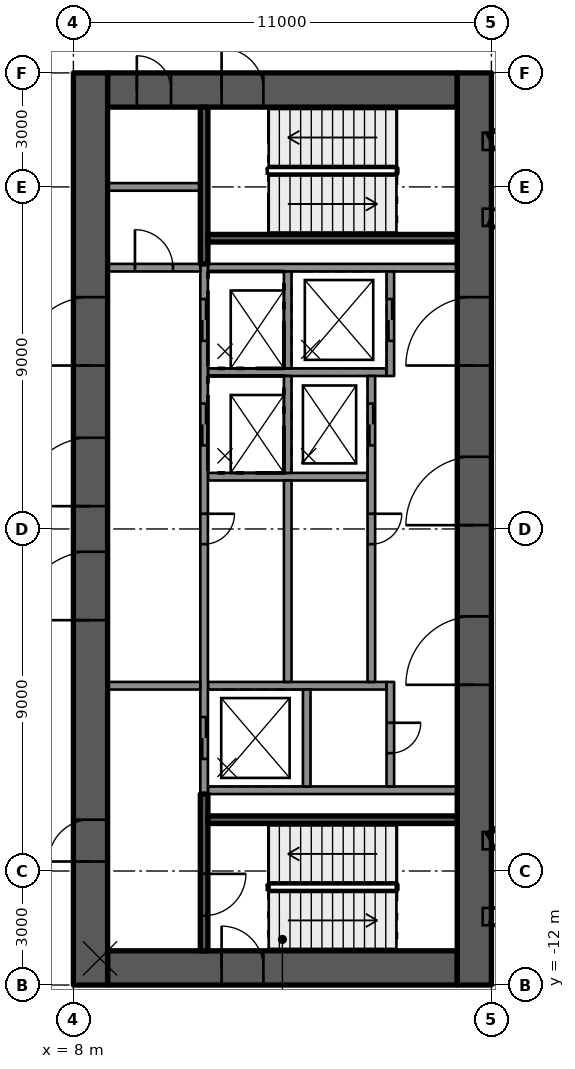
"""IFC4 building model, lengths in metres.
Left out: names, types, materials, properties, quantities, classifications, styles, units other than length and angle.
Written with IfcOpenShell. Run it as: python <this file> out.ifc"""

import sys

from ifc_helpers import new_model, si_unit, direction, frame, frame_2d, origin, place, context, subcontext, project, spatial, rectangle, extrude, element, fill, save


model = new_model("IFC4")
c1 = context("Model", 3, precision=1e-05, world=origin(), true_north=direction((0.0, 1.0)))
c2 = subcontext(c1, "Body", "Model", "MODEL_VIEW")
j1 = project(units=[si_unit("LENGTHUNIT", "METRE"), si_unit("PLANEANGLEUNIT", "RADIAN")], contexts=[c1])
p1 = place(None, origin())
s1 = spatial("IfcSite", under=j1, at=p1, CompositionType="ELEMENT")
p2 = place(p1, origin())
s2 = spatial("IfcBuilding", under=s1, at=p2, CompositionType="ELEMENT")
p3 = place(p2, frame((0.0, 0.0, 206.1)))
s3 = spatial("IfcBuildingStorey", under=s2, at=p3, CompositionType="ELEMENT", Elevation=206.1)
p4 = place(p3, frame((8.9, 11.55, 0.0), z_axis=(0.0, 0.0, 1.0), x_axis=(1.0, 0.0, 0.0)))
e1 = element("IfcWall", 1, at=p4, inside=s3, PredefinedType="SHEAR", context=c2, shape_type="SweptSolid", body=[
    extrude(rectangle(XDim=9.2, YDim=0.9, at=frame_2d((4.6, 0.0))), origin(), (0.0, 0.0, 1.0), 4.4),
])
p5 = place(p4, frame((3.0, 0.0, 0.0)))
e2 = element("IfcOpeningElement", 2, at=p5, cuts=e1, PredefinedType="OPENING", context=c2, shape_type="SweptSolid", body=[
    extrude(rectangle(XDim=1.1, YDim=2.1, at=frame_2d((0.55, 1.05))), frame((0.0, 0.46, 0.0), z_axis=(0.0, -1.0, 0.0), x_axis=(1.0, 0.0, 0.0)), (0.0, 0.0, 1.0), 0.92),
])
p6 = place(p4, frame((0.77, 0.0, 0.0)))
e3 = element("IfcOpeningElement", 3, at=p6, cuts=e1, PredefinedType="OPENING", context=c2, shape_type="SweptSolid", body=[
    extrude(rectangle(XDim=0.9, YDim=2.1, at=frame_2d((0.45, 1.05))), frame((0.0, 0.46, 0.0), z_axis=(0.0, -1.0, 0.0), x_axis=(1.0, 0.0, 0.0)), (0.0, 0.0, 1.0), 0.92),
])
p7 = place(p3, frame((8.9, -11.55, 0.0), z_axis=(0.0, 0.0, 1.0), x_axis=(1.0, 0.0, 0.0)))
e4 = element("IfcWall", 4, at=p7, inside=s3, PredefinedType="SHEAR", context=c2, shape_type="SweptSolid", body=[
    extrude(rectangle(XDim=9.2, YDim=0.9, at=frame_2d((4.6, 0.0))), origin(), (0.0, 0.0, 1.0), 4.4),
])
p8 = place(p7, frame((3.0, 0.0, 0.0)))
e5 = element("IfcOpeningElement", 5, at=p8, cuts=e4, PredefinedType="OPENING", context=c2, shape_type="SweptSolid", body=[
    extrude(rectangle(XDim=1.1, YDim=2.1, at=frame_2d((0.55, 1.05))), frame((0.0, 0.46, 0.0), z_axis=(0.0, -1.0, 0.0), x_axis=(1.0, 0.0, 0.0)), (0.0, 0.0, 1.0), 0.92),
])
p9 = place(p3, frame((8.45, -12.0, 0.0), z_axis=(0.0, 0.0, 1.0), x_axis=(0.0, 1.0, 0.0)))
e6 = element("IfcWall", 6, at=p9, inside=s3, PredefinedType="SHEAR", context=c2, shape_type="SweptSolid", body=[
    extrude(rectangle(XDim=24.0, YDim=0.9, at=frame_2d((12.0, 0.0))), origin(), (0.0, 0.0, 1.0), 4.4),
])
p10 = place(p9, frame((12.6, 0.0, 0.0)))
e7 = element("IfcOpeningElement", 7, at=p10, cuts=e6, PredefinedType="OPENING", context=c2, shape_type="SweptSolid", body=[
    extrude(rectangle(XDim=1.8, YDim=2.1, at=frame_2d((0.9, 1.05))), frame((0.0, 0.46, 0.0), z_axis=(0.0, -1.0, 0.0), x_axis=(1.0, 0.0, 0.0)), (0.0, 0.0, 1.0), 0.92),
])
p11 = place(p9, frame((16.3, 0.0, 0.0)))
e8 = element("IfcOpeningElement", 8, at=p11, cuts=e6, PredefinedType="OPENING", context=c2, shape_type="SweptSolid", body=[
    extrude(rectangle(XDim=1.8, YDim=2.1, at=frame_2d((0.9, 1.05))), frame((0.0, 0.46, 0.0), z_axis=(0.0, -1.0, 0.0), x_axis=(1.0, 0.0, 0.0)), (0.0, 0.0, 1.0), 0.92),
])
p12 = place(p9, frame((9.6, 0.0, 0.0)))
e9 = element("IfcOpeningElement", 9, at=p12, cuts=e6, PredefinedType="OPENING", context=c2, shape_type="SweptSolid", body=[
    extrude(rectangle(XDim=1.8, YDim=2.1, at=frame_2d((0.9, 1.05))), frame((0.0, 0.46, 0.0), z_axis=(0.0, -1.0, 0.0), x_axis=(1.0, 0.0, 0.0)), (0.0, 0.0, 1.0), 0.92),
])
p13 = place(p9, frame((3.25, 0.0, 0.0)))
e10 = element("IfcOpeningElement", 10, at=p13, cuts=e6, PredefinedType="OPENING", context=c2, shape_type="SweptSolid", body=[
    extrude(rectangle(XDim=1.1, YDim=2.1, at=frame_2d((0.55, 1.05))), frame((0.0, 0.46, 0.0), z_axis=(0.0, -1.0, 0.0), x_axis=(1.0, 0.0, 0.0)), (0.0, 0.0, 1.0), 0.92),
])
p14 = place(p3, frame((18.55, -12.0, 0.0), z_axis=(0.0, 0.0, 1.0), x_axis=(0.0, 1.0, 0.0)))
e11 = element("IfcWall", 11, at=p14, inside=s3, PredefinedType="SHEAR", context=c2, shape_type="SweptSolid", body=[
    extrude(rectangle(XDim=24.0, YDim=0.9, at=frame_2d((12.0, 0.0))), origin(), (0.0, 0.0, 1.0), 4.4),
])
p15 = place(p14, frame((16.3, 0.0, 0.0)))
e12 = element("IfcOpeningElement", 12, at=p15, cuts=e11, PredefinedType="OPENING", context=c2, shape_type="SweptSolid", body=[
    extrude(rectangle(XDim=1.8, YDim=2.1, at=frame_2d((0.9, 1.05))), frame((0.0, 0.46, 0.0), z_axis=(0.0, -1.0, 0.0), x_axis=(1.0, 0.0, 0.0)), (0.0, 0.0, 1.0), 0.92),
])
p16 = place(p14, frame((12.1, 0.0, 0.0)))
e13 = element("IfcOpeningElement", 13, at=p16, cuts=e11, PredefinedType="OPENING", context=c2, shape_type="SweptSolid", body=[
    extrude(rectangle(XDim=1.8, YDim=2.1, at=frame_2d((0.9, 1.05))), frame((0.0, 0.46, 0.0), z_axis=(0.0, -1.0, 0.0), x_axis=(1.0, 0.0, 0.0)), (0.0, 0.0, 1.0), 0.92),
])
p17 = place(p14, frame((7.9, 0.0, 0.0)))
e14 = element("IfcOpeningElement", 14, at=p17, cuts=e11, PredefinedType="OPENING", context=c2, shape_type="SweptSolid", body=[
    extrude(rectangle(XDim=1.8, YDim=2.1, at=frame_2d((0.9, 1.05))), frame((0.0, 0.46, 0.0), z_axis=(0.0, -1.0, 0.0), x_axis=(1.0, 0.0, 0.0)), (0.0, 0.0, 1.0), 0.92),
])
for number, where, z_axis, x_axis in (
    (15, (11.54, -6.875, 0.0), (0.0, 0.0, 1.0), (1.0, 0.0, 0.0)),
    (16, (11.54, 6.875, 0.0), (0.0, 0.0, 1.0), (1.0, 0.0, 0.0)),
):
    element("IfcWall", number, at=place(p3, frame(where, z_axis=z_axis, x_axis=x_axis)), inside=s3, PredefinedType="SOLIDWALL", context=c2, shape_type="SweptSolid", body=[
        extrude(rectangle(XDim=6.56, YDim=0.2, at=frame_2d((3.28, 0.0))), origin(), (0.0, 0.0, 1.0), 3.99),
    ])
p18 = place(p3, frame((11.54, 4.125, 0.0), z_axis=(0.0, 0.0, 1.0), x_axis=(1.0, 0.0, 0.0)))
e17 = element("IfcWall", 17, at=p18, inside=s3, PredefinedType="SOLIDWALL", context=c2, shape_type="SweptSolid", body=[
    extrude(rectangle(XDim=4.7, YDim=0.2, at=frame_2d((2.35, 0.0))), origin(), (0.0, 0.0, 1.0), 3.99),
])
p19 = place(p3, frame((11.54, 1.375, 0.0), z_axis=(0.0, 0.0, 1.0), x_axis=(1.0, 0.0, 0.0)))
e18 = element("IfcWall", 18, at=p19, inside=s3, PredefinedType="SOLIDWALL", context=c2, shape_type="SweptSolid", body=[
    extrude(rectangle(XDim=4.2, YDim=0.2, at=frame_2d((2.1, 0.0))), origin(), (0.0, 0.0, 1.0), 3.99),
])
p20 = place(p3, frame((11.54, -4.125, 0.0), z_axis=(0.0, 0.0, 1.0), x_axis=(1.0, 0.0, 0.0)))
e19 = element("IfcWall", 19, at=p20, inside=s3, PredefinedType="SOLIDWALL", context=c2, shape_type="SweptSolid", body=[
    extrude(rectangle(XDim=4.7, YDim=0.2, at=frame_2d((2.35, 0.0))), origin(), (0.0, 0.0, 1.0), 3.99),
])
p21 = place(p3, frame((11.44, 6.975, 0.0), z_axis=(0.0, 0.0, 1.0), x_axis=(0.0, -1.0, 0.0)))
e20 = element("IfcWall", 20, at=p21, inside=s3, PredefinedType="SOLIDWALL", context=c2, shape_type="SweptSolid", body=[
    extrude(rectangle(XDim=13.95, YDim=0.2, at=frame_2d((6.975, 0.0))), origin(), (0.0, 0.0, 1.0), 3.99),
])
p22 = place(p21, frame((0.925, 0.0, 0.0)))
e21 = element("IfcOpeningElement", 21, at=p22, cuts=e20, PredefinedType="OPENING", context=c2, shape_type="SweptSolid", body=[
    extrude(rectangle(XDim=1.1, YDim=2.1, at=frame_2d((0.55, 1.05))), frame((0.0, 0.11, 0.0), z_axis=(0.0, -1.0, 0.0), x_axis=(1.0, 0.0, 0.0)), (0.0, 0.0, 1.0), 0.22),
])
p23 = place(p21, frame((3.675, 0.0, 0.0)))
e22 = element("IfcOpeningElement", 22, at=p23, cuts=e20, PredefinedType="OPENING", context=c2, shape_type="SweptSolid", body=[
    extrude(rectangle(XDim=1.1, YDim=2.1, at=frame_2d((0.55, 1.05))), frame((0.0, 0.11, 0.0), z_axis=(0.0, -1.0, 0.0), x_axis=(1.0, 0.0, 0.0)), (0.0, 0.0, 1.0), 0.22),
])
p24 = place(p21, frame((11.925, 0.0, 0.0)))
e23 = element("IfcOpeningElement", 23, at=p24, cuts=e20, PredefinedType="OPENING", context=c2, shape_type="SweptSolid", body=[
    extrude(rectangle(XDim=1.1, YDim=2.1, at=frame_2d((0.55, 1.05))), frame((0.0, 0.11, 0.0), z_axis=(0.0, -1.0, 0.0), x_axis=(1.0, 0.0, 0.0)), (0.0, 0.0, 1.0), 0.22),
])
p25 = place(p21, frame((6.575, 0.0, 0.0)))
e24 = element("IfcOpeningElement", 24, at=p25, cuts=e20, PredefinedType="OPENING", context=c2, shape_type="SweptSolid", body=[
    extrude(rectangle(XDim=0.8, YDim=2.1, at=frame_2d((0.4, 1.05))), frame((0.0, 0.11, 0.0), z_axis=(0.0, -1.0, 0.0), x_axis=(1.0, 0.0, 0.0)), (0.0, 0.0, 1.0), 0.22),
])
for number, where, z_axis, x_axis in (
    (25, (13.64, 6.775, 0.0), (0.0, 0.0, 1.0), (0.0, -1.0, 0.0)),
    (26, (13.64, 4.025, 0.0), (0.0, 0.0, 1.0), (0.0, -1.0, 0.0)),
):
    element("IfcWall", number, at=place(p3, frame(where, z_axis=z_axis, x_axis=x_axis)), inside=s3, PredefinedType="SOLIDWALL", context=c2, shape_type="SweptSolid", body=[
        extrude(rectangle(XDim=2.55, YDim=0.2, at=frame_2d((1.275, 0.0))), origin(), (0.0, 0.0, 1.0), 3.99),
    ])
p26 = place(p3, frame((13.64, 1.275, 0.0), z_axis=(0.0, 0.0, 1.0), x_axis=(0.0, -1.0, 0.0)))
e27 = element("IfcWall", 27, at=p26, inside=s3, PredefinedType="SOLIDWALL", context=c2, shape_type="SweptSolid", body=[
    extrude(rectangle(XDim=5.3, YDim=0.2, at=frame_2d((2.65, 0.0))), origin(), (0.0, 0.0, 1.0), 3.99),
])
p27 = place(p3, frame((14.14, -4.225, 0.0), z_axis=(0.0, 0.0, 1.0), x_axis=(0.0, -1.0, 0.0)))
e28 = element("IfcWall", 28, at=p27, inside=s3, PredefinedType="SOLIDWALL", context=c2, shape_type="SweptSolid", body=[
    extrude(rectangle(XDim=2.55, YDim=0.2, at=frame_2d((1.275, 0.0))), origin(), (0.0, 0.0, 1.0), 3.99),
])
p28 = place(p3, frame((16.34, 6.775, 0.0), z_axis=(0.0, 0.0, 1.0), x_axis=(0.0, -1.0, 0.0)))
e29 = element("IfcWall", 29, at=p28, inside=s3, PredefinedType="SOLIDWALL", context=c2, shape_type="SweptSolid", body=[
    extrude(rectangle(XDim=2.75, YDim=0.2, at=frame_2d((1.375, 0.0))), origin(), (0.0, 0.0, 1.0), 3.99),
])
p29 = place(p28, frame((0.725, 0.0, 0.0)))
e30 = element("IfcOpeningElement", 30, at=p29, cuts=e29, PredefinedType="OPENING", context=c2, shape_type="SweptSolid", body=[
    extrude(rectangle(XDim=1.1, YDim=2.1, at=frame_2d((0.55, 1.05))), frame((0.0, 0.11, 0.0), z_axis=(0.0, -1.0, 0.0), x_axis=(1.0, 0.0, 0.0)), (0.0, 0.0, 1.0), 0.22),
])
p30 = place(p3, frame((15.84, 4.025, 0.0), z_axis=(0.0, 0.0, 1.0), x_axis=(0.0, -1.0, 0.0)))
e31 = element("IfcWall", 31, at=p30, inside=s3, PredefinedType="SOLIDWALL", context=c2, shape_type="SweptSolid", body=[
    extrude(rectangle(XDim=8.05, YDim=0.2, at=frame_2d((4.025, 0.0))), origin(), (0.0, 0.0, 1.0), 3.99),
])
p31 = place(p30, frame((0.725, 0.0, 0.0)))
e32 = element("IfcOpeningElement", 32, at=p31, cuts=e31, PredefinedType="OPENING", context=c2, shape_type="SweptSolid", body=[
    extrude(rectangle(XDim=1.1, YDim=2.1, at=frame_2d((0.55, 1.05))), frame((0.0, 0.11, 0.0), z_axis=(0.0, -1.0, 0.0), x_axis=(1.0, 0.0, 0.0)), (0.0, 0.0, 1.0), 0.22),
])
p32 = place(p30, frame((3.625, 0.0, 0.0)))
e33 = element("IfcOpeningElement", 33, at=p32, cuts=e31, PredefinedType="OPENING", context=c2, shape_type="SweptSolid", body=[
    extrude(rectangle(XDim=0.8, YDim=2.1, at=frame_2d((0.4, 1.05))), frame((0.0, 0.11, 0.0), z_axis=(0.0, -1.0, 0.0), x_axis=(1.0, 0.0, 0.0)), (0.0, 0.0, 1.0), 0.22),
])
p33 = place(p3, frame((16.34, -4.025, 0.0), z_axis=(0.0, 0.0, 1.0), x_axis=(0.0, -1.0, 0.0)))
e34 = element("IfcWall", 34, at=p33, inside=s3, PredefinedType="SOLIDWALL", context=c2, shape_type="SweptSolid", body=[
    extrude(rectangle(XDim=2.75, YDim=0.2, at=frame_2d((1.375, 0.0))), origin(), (0.0, 0.0, 1.0), 3.99),
])
p34 = place(p33, frame((1.075, 0.0, 0.0)))
e35 = element("IfcOpeningElement", 35, at=p34, cuts=e34, PredefinedType="OPENING", context=c2, shape_type="SweptSolid", body=[
    extrude(rectangle(XDim=0.8, YDim=2.1, at=frame_2d((0.4, 1.05))), frame((0.0, 0.11, 0.0), z_axis=(0.0, -1.0, 0.0), x_axis=(1.0, 0.0, 0.0)), (0.0, 0.0, 1.0), 0.22),
])
p35 = place(p3, frame((11.44, -6.975, 0.0), z_axis=(0.0, 0.0, 1.0), x_axis=(0.0, -1.0, 0.0)))
e36 = element("IfcWall", 36, at=p35, inside=s3, PredefinedType="SOLIDWALL", context=c2, shape_type="SweptSolid", body=[
    extrude(rectangle(XDim=4.125, YDim=0.2, at=frame_2d((2.062, 0.0))), origin(), (0.0, 0.0, 1.0), 3.99),
])
p36 = place(p35, frame((2.1, 0.0, 0.0)))
e37 = element("IfcOpeningElement", 37, at=p36, cuts=e36, PredefinedType="OPENING", context=c2, shape_type="SweptSolid", body=[
    extrude(rectangle(XDim=1.1, YDim=2.1, at=frame_2d((0.55, 1.05))), frame((0.0, 0.11, 0.0), z_axis=(0.0, -1.0, 0.0), x_axis=(1.0, 0.0, 0.0)), (0.0, 0.0, 1.0), 0.22),
])
p37 = place(p3, frame((11.54, -7.65, 0.0), z_axis=(0.0, 0.0, 1.0), x_axis=(1.0, 0.0, 0.0)))
e38 = element("IfcWall", 38, at=p37, inside=s3, PredefinedType="SOLIDWALL", context=c2, shape_type="SweptSolid", body=[
    extrude(rectangle(XDim=6.56, YDim=0.2, at=frame_2d((3.28, 0.0))), origin(), (0.0, 0.0, 1.0), 3.99),
])
p38 = place(p3, frame((11.44, 11.1, 0.0), z_axis=(0.0, 0.0, 1.0), x_axis=(0.0, -1.0, 0.0)))
e39 = element("IfcWall", 39, at=p38, inside=s3, PredefinedType="SOLIDWALL", context=c2, shape_type="SweptSolid", body=[
    extrude(rectangle(XDim=4.125, YDim=0.2, at=frame_2d((2.062, 0.0))), origin(), (0.0, 0.0, 1.0), 3.99),
])
p39 = place(p3, frame((11.54, 7.65, 0.0), z_axis=(0.0, 0.0, 1.0), x_axis=(1.0, 0.0, 0.0)))
e40 = element("IfcWall", 40, at=p39, inside=s3, PredefinedType="SOLIDWALL", context=c2, shape_type="SweptSolid", body=[
    extrude(rectangle(XDim=6.56, YDim=0.2, at=frame_2d((3.28, 0.0))), origin(), (0.0, 0.0, 1.0), 3.99),
])
p40 = place(p3, frame((8.9, -4.125, 0.0), z_axis=(0.0, 0.0, 1.0), x_axis=(1.0, 0.0, 0.0)))
e41 = element("IfcWall", 41, at=p40, inside=s3, PredefinedType="PARTITIONING", context=c2, shape_type="SweptSolid", body=[
    extrude(rectangle(XDim=2.44, YDim=0.2, at=frame_2d((1.22, 0.0))), origin(), (0.0, 0.0, 1.0), 3.99),
])
p41 = place(p3, frame((8.9, 6.875, 0.0), z_axis=(0.0, 0.0, 1.0), x_axis=(1.0, 0.0, 0.0)))
e42 = element("IfcWall", 42, at=p41, inside=s3, PredefinedType="PARTITIONING", context=c2, shape_type="SweptSolid", body=[
    extrude(rectangle(XDim=2.44, YDim=0.2, at=frame_2d((1.22, 0.0))), origin(), (0.0, 0.0, 1.0), 3.99),
])
p42 = place(p41, frame((0.72, 0.0, 0.0)))
e43 = element("IfcOpeningElement", 43, at=p42, cuts=e42, PredefinedType="OPENING", context=c2, shape_type="SweptSolid", body=[
    extrude(rectangle(XDim=1.0, YDim=2.1, at=frame_2d((0.5, 1.05))), frame((0.0, 0.11, 0.0), z_axis=(0.0, -1.0, 0.0), x_axis=(1.0, 0.0, 0.0)), (0.0, 0.0, 1.0), 0.22),
])
p43 = place(p3, frame((8.9, 9.0, 0.0), z_axis=(0.0, 0.0, 1.0), x_axis=(1.0, 0.0, 0.0)))
e44 = element("IfcWall", 44, at=p43, inside=s3, PredefinedType="PARTITIONING", context=c2, shape_type="SweptSolid", body=[
    extrude(rectangle(XDim=2.44, YDim=0.2, at=frame_2d((1.22, 0.0))), origin(), (0.0, 0.0, 1.0), 3.99),
])
p44 = place(p22, origin())
e45 = element("IfcDoor", 45, at=p44, inside=s3, OperationType="DOUBLE_DOOR_SLIDING", PredefinedType="DOOR", context=c2, shape_type="SweptSolid", body=[
    extrude(rectangle(XDim=1.1, YDim=2.1, at=frame_2d((0.55, 1.05))), frame((0.0, 0.025, 0.0), z_axis=(0.0, -1.0, 0.0), x_axis=(1.0, 0.0, 0.0)), (0.0, 0.0, 1.0), 0.05),
])
fill(e21, e45)
p45 = place(p29, origin())
e46 = element("IfcDoor", 46, at=p45, inside=s3, OperationType="DOUBLE_DOOR_SLIDING", PredefinedType="DOOR", context=c2, shape_type="SweptSolid", body=[
    extrude(rectangle(XDim=1.1, YDim=2.1, at=frame_2d((0.55, 1.05))), frame((0.0, 0.025, 0.0), z_axis=(0.0, -1.0, 0.0), x_axis=(1.0, 0.0, 0.0)), (0.0, 0.0, 1.0), 0.05),
])
fill(e30, e46)
p46 = place(p23, origin())
e47 = element("IfcDoor", 47, at=p46, inside=s3, OperationType="DOUBLE_DOOR_SLIDING", PredefinedType="DOOR", context=c2, shape_type="SweptSolid", body=[
    extrude(rectangle(XDim=1.1, YDim=2.1, at=frame_2d((0.55, 1.05))), frame((0.0, 0.025, 0.0), z_axis=(0.0, -1.0, 0.0), x_axis=(1.0, 0.0, 0.0)), (0.0, 0.0, 1.0), 0.05),
])
fill(e22, e47)
p47 = place(p31, origin())
e48 = element("IfcDoor", 48, at=p47, inside=s3, OperationType="DOUBLE_DOOR_SLIDING", PredefinedType="DOOR", context=c2, shape_type="SweptSolid", body=[
    extrude(rectangle(XDim=1.1, YDim=2.1, at=frame_2d((0.55, 1.05))), frame((0.0, 0.025, 0.0), z_axis=(0.0, -1.0, 0.0), x_axis=(1.0, 0.0, 0.0)), (0.0, 0.0, 1.0), 0.05),
])
fill(e32, e48)
p48 = place(p24, origin())
e49 = element("IfcDoor", 49, at=p48, inside=s3, OperationType="DOUBLE_DOOR_SLIDING", PredefinedType="DOOR", context=c2, shape_type="SweptSolid", body=[
    extrude(rectangle(XDim=1.1, YDim=2.1, at=frame_2d((0.55, 1.05))), frame((0.0, 0.025, 0.0), z_axis=(0.0, -1.0, 0.0), x_axis=(1.0, 0.0, 0.0)), (0.0, 0.0, 1.0), 0.05),
])
fill(e23, e49)
p49 = place(p25, origin())
e50 = element("IfcDoor", 50, at=p49, inside=s3, OperationType="SINGLE_SWING_LEFT", PredefinedType="DOOR", context=c2, shape_type="SweptSolid", body=[
    extrude(rectangle(XDim=0.8, YDim=2.1, at=frame_2d((0.4, 1.05))), frame((0.0, 0.025, 0.0), z_axis=(0.0, -1.0, 0.0), x_axis=(1.0, 0.0, 0.0)), (0.0, 0.0, 1.0), 0.05),
])
fill(e24, e50)
p50 = place(p32, origin())
e51 = element("IfcDoor", 51, at=p50, inside=s3, OperationType="SINGLE_SWING_LEFT", PredefinedType="DOOR", context=c2, shape_type="SweptSolid", body=[
    extrude(rectangle(XDim=0.8, YDim=2.1, at=frame_2d((0.4, 1.05))), frame((0.0, 0.025, 0.0), z_axis=(0.0, -1.0, 0.0), x_axis=(1.0, 0.0, 0.0)), (0.0, 0.0, 1.0), 0.05),
])
fill(e33, e51)
p51 = place(p34, origin())
e52 = element("IfcDoor", 52, at=p51, inside=s3, OperationType="SINGLE_SWING_LEFT", PredefinedType="DOOR", context=c2, shape_type="SweptSolid", body=[
    extrude(rectangle(XDim=0.8, YDim=2.1, at=frame_2d((0.4, 1.05))), frame((0.0, 0.025, 0.0), z_axis=(0.0, -1.0, 0.0), x_axis=(1.0, 0.0, 0.0)), (0.0, 0.0, 1.0), 0.05),
])
fill(e35, e52)
p52 = place(p10, origin())
e53 = element("IfcDoor", 53, at=p52, inside=s3, OperationType="SINGLE_SWING_RIGHT", PredefinedType="DOOR", context=c2, shape_type="SweptSolid", body=[
    extrude(rectangle(XDim=1.8, YDim=2.1, at=frame_2d((0.9, 1.05))), frame((0.0, 0.025, 0.0), z_axis=(0.0, -1.0, 0.0), x_axis=(1.0, 0.0, 0.0)), (0.0, 0.0, 1.0), 0.05),
])
fill(e7, e53)
p53 = place(p15, origin())
e54 = element("IfcDoor", 54, at=p53, inside=s3, OperationType="SINGLE_SWING_RIGHT", PredefinedType="DOOR", context=c2, shape_type="SweptSolid", body=[
    extrude(rectangle(XDim=1.8, YDim=2.1, at=frame_2d((0.9, 1.05))), frame((0.0, 0.025, 0.0), z_axis=(0.0, -1.0, 0.0), x_axis=(1.0, 0.0, 0.0)), (0.0, 0.0, 1.0), 0.05),
])
fill(e12, e54)
p54 = place(p16, origin())
e55 = element("IfcDoor", 55, at=p54, inside=s3, OperationType="SINGLE_SWING_RIGHT", PredefinedType="DOOR", context=c2, shape_type="SweptSolid", body=[
    extrude(rectangle(XDim=1.8, YDim=2.1, at=frame_2d((0.9, 1.05))), frame((0.0, 0.025, 0.0), z_axis=(0.0, -1.0, 0.0), x_axis=(1.0, 0.0, 0.0)), (0.0, 0.0, 1.0), 0.05),
])
fill(e13, e55)
p55 = place(p17, origin())
e56 = element("IfcDoor", 56, at=p55, inside=s3, OperationType="SINGLE_SWING_LEFT", PredefinedType="DOOR", context=c2, shape_type="SweptSolid", body=[
    extrude(rectangle(XDim=1.8, YDim=2.1, at=frame_2d((0.9, 1.05))), frame((0.0, 0.025, 0.0), z_axis=(0.0, -1.0, 0.0), x_axis=(1.0, 0.0, 0.0)), (0.0, 0.0, 1.0), 0.05),
])
fill(e14, e56)
p56 = place(p11, origin())
e57 = element("IfcDoor", 57, at=p56, inside=s3, OperationType="SINGLE_SWING_RIGHT", PredefinedType="DOOR", context=c2, shape_type="SweptSolid", body=[
    extrude(rectangle(XDim=1.8, YDim=2.1, at=frame_2d((0.9, 1.05))), frame((0.0, 0.025, 0.0), z_axis=(0.0, -1.0, 0.0), x_axis=(1.0, 0.0, 0.0)), (0.0, 0.0, 1.0), 0.05),
])
fill(e8, e57)
p57 = place(p12, origin())
e58 = element("IfcDoor", 58, at=p57, inside=s3, OperationType="SINGLE_SWING_LEFT", PredefinedType="DOOR", context=c2, shape_type="SweptSolid", body=[
    extrude(rectangle(XDim=1.8, YDim=2.1, at=frame_2d((0.9, 1.05))), frame((0.0, 0.025, 0.0), z_axis=(0.0, -1.0, 0.0), x_axis=(1.0, 0.0, 0.0)), (0.0, 0.0, 1.0), 0.05),
])
fill(e9, e58)
p58 = place(p13, origin())
e59 = element("IfcDoor", 59, at=p58, inside=s3, OperationType="SINGLE_SWING_LEFT", PredefinedType="DOOR", context=c2, shape_type="SweptSolid", body=[
    extrude(rectangle(XDim=1.1, YDim=2.1, at=frame_2d((0.55, 1.05))), frame((0.0, 0.025, 0.0), z_axis=(0.0, -1.0, 0.0), x_axis=(1.0, 0.0, 0.0)), (0.0, 0.0, 1.0), 0.05),
])
fill(e10, e59)
p59 = place(p8, origin())
e60 = element("IfcDoor", 60, at=p59, inside=s3, OperationType="SINGLE_SWING_LEFT", PredefinedType="DOOR", context=c2, shape_type="SweptSolid", body=[
    extrude(rectangle(XDim=1.1, YDim=2.1, at=frame_2d((0.55, 1.05))), frame((0.0, 0.025, 0.0), z_axis=(0.0, -1.0, 0.0), x_axis=(1.0, 0.0, 0.0)), (0.0, 0.0, 1.0), 0.05),
])
fill(e5, e60)
p60 = place(p5, origin())
e61 = element("IfcDoor", 61, at=p60, inside=s3, OperationType="SINGLE_SWING_LEFT", PredefinedType="DOOR", context=c2, shape_type="SweptSolid", body=[
    extrude(rectangle(XDim=1.1, YDim=2.1, at=frame_2d((0.55, 1.05))), frame((0.0, 0.025, 0.0), z_axis=(0.0, -1.0, 0.0), x_axis=(1.0, 0.0, 0.0)), (0.0, 0.0, 1.0), 0.05),
])
fill(e2, e61)
p61 = place(p36, origin())
e62 = element("IfcDoor", 62, at=p61, inside=s3, OperationType="SINGLE_SWING_RIGHT", PredefinedType="DOOR", context=c2, shape_type="SweptSolid", body=[
    extrude(rectangle(XDim=1.1, YDim=2.1, at=frame_2d((0.55, 1.05))), frame((0.0, 0.025, 0.0), z_axis=(0.0, -1.0, 0.0), x_axis=(1.0, 0.0, 0.0)), (0.0, 0.0, 1.0), 0.05),
])
fill(e37, e62)
p62 = place(p6, origin())
e63 = element("IfcDoor", 63, at=p62, inside=s3, OperationType="SINGLE_SWING_LEFT", PredefinedType="DOOR", context=c2, shape_type="SweptSolid", body=[
    extrude(rectangle(XDim=0.9, YDim=2.1, at=frame_2d((0.45, 1.05))), frame((0.0, 0.025, 0.0), z_axis=(0.0, -1.0, 0.0), x_axis=(1.0, 0.0, 0.0)), (0.0, 0.0, 1.0), 0.05),
])
fill(e3, e63)
p63 = place(p42, origin())
e64 = element("IfcDoor", 64, at=p63, inside=s3, OperationType="SINGLE_SWING_RIGHT", PredefinedType="DOOR", context=c2, shape_type="SweptSolid", body=[
    extrude(rectangle(XDim=1.0, YDim=2.1, at=frame_2d((0.5, 1.05))), frame((0.0, 0.025, 0.0), z_axis=(0.0, -1.0, 0.0), x_axis=(1.0, 0.0, 0.0)), (0.0, 0.0, 1.0), 0.05),
])
fill(e43, e64)
save(model, sys.argv[1])
